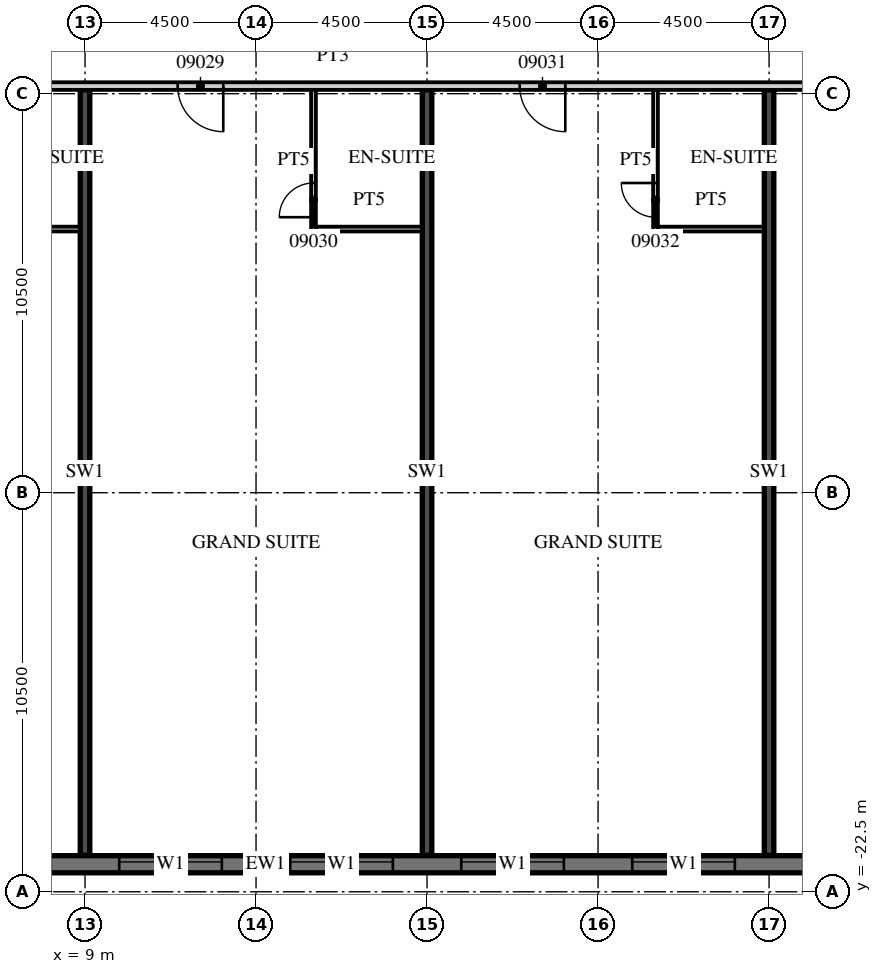
"""IFC4 building model, lengths in metres.
Left out: names, types, materials, properties, quantities, classifications, styles, units other than length and angle.
Written with IfcOpenShell. Run it as: python <this file> out.ifc"""

import sys

from ifc_helpers import new_model, si_unit, direction, frame, frame_2d, origin, place, context, subcontext, project, spatial, rectangle, extrude, element, fill, save


model = new_model("IFC4")
c1 = context("Model", 3, precision=1e-05, world=origin(), true_north=direction((0.0, 1.0)))
c2 = subcontext(c1, "Body", "Model", "MODEL_VIEW")
j1 = project(units=[si_unit("LENGTHUNIT", "METRE"), si_unit("PLANEANGLEUNIT", "RADIAN")], contexts=[c1])
p1 = place(None, origin())
s1 = spatial("IfcSite", under=j1, at=p1, CompositionType="ELEMENT")
p2 = place(p1, origin())
s2 = spatial("IfcBuilding", under=s1, at=p2, CompositionType="ELEMENT")
p3 = place(p2, frame((0.0, 0.0, 60.0)))
s3 = spatial("IfcBuildingStorey", under=s2, at=p3, CompositionType="ELEMENT", Elevation=60.0)
for number, where, z_axis, x_axis in (
    (1, (9.0, -21.54, 0.0), (0.0, 0.0, 1.0), (0.0, 1.0, 0.0)),
    (2, (18.0, -21.54, 0.0), (0.0, 0.0, 1.0), (0.0, 1.0, 0.0)),
    (3, (27.0, -21.54, 0.0), (0.0, 0.0, 1.0), (0.0, 1.0, 0.0)),
):
    element("IfcWall", number, at=place(p3, frame(where, z_axis=z_axis, x_axis=x_axis)), inside=s3, PredefinedType="SHEAR", context=c2, shape_type="SweptSolid", body=[
        extrude(rectangle(XDim=20.14, YDim=0.25, at=frame_2d((10.07, 0.0))), origin(), (0.0, 0.0, 1.0), 3.3),
    ])
p4 = place(p3, frame((-13.5, -21.775, 0.0), z_axis=(0.0, 0.0, 1.0), x_axis=(1.0, 0.0, 0.0)))
e4 = element("IfcWall", 4, at=p4, inside=s3, PredefinedType="SOLIDWALL", context=c2, shape_type="SweptSolid", body=[
    extrude(rectangle(XDim=54.5, YDim=0.45, at=frame_2d((27.25, 0.0))), origin(), (0.0, 0.0, 1.0), 3.02),
])
p5 = place(p4, frame((0.9, 0.0, 0.45)))
e5 = element("IfcOpeningElement", 5, at=p5, cuts=e4, PredefinedType="OPENING", context=c2, shape_type="SweptSolid", body=[
    extrude(rectangle(XDim=2.7, YDim=2.25, at=frame_2d((1.35, 1.125))), frame((0.0, 0.235, 0.0), z_axis=(0.0, -1.0, 0.0), x_axis=(1.0, 0.0, 0.0)), (0.0, 0.0, 1.0), 0.47),
])
p6 = place(p4, frame((5.4, 0.0, 0.45)))
e6 = element("IfcOpeningElement", 6, at=p6, cuts=e4, PredefinedType="OPENING", context=c2, shape_type="SweptSolid", body=[
    extrude(rectangle(XDim=2.7, YDim=2.25, at=frame_2d((1.35, 1.125))), frame((0.0, 0.235, 0.0), z_axis=(0.0, -1.0, 0.0), x_axis=(1.0, 0.0, 0.0)), (0.0, 0.0, 1.0), 0.47),
])
p7 = place(p4, frame((9.9, 0.0, 0.45)))
e7 = element("IfcOpeningElement", 7, at=p7, cuts=e4, PredefinedType="OPENING", context=c2, shape_type="SweptSolid", body=[
    extrude(rectangle(XDim=2.7, YDim=2.25, at=frame_2d((1.35, 1.125))), frame((0.0, 0.235, 0.0), z_axis=(0.0, -1.0, 0.0), x_axis=(1.0, 0.0, 0.0)), (0.0, 0.0, 1.0), 0.47),
])
p8 = place(p4, frame((14.4, 0.0, 0.45)))
e8 = element("IfcOpeningElement", 8, at=p8, cuts=e4, PredefinedType="OPENING", context=c2, shape_type="SweptSolid", body=[
    extrude(rectangle(XDim=2.7, YDim=2.25, at=frame_2d((1.35, 1.125))), frame((0.0, 0.235, 0.0), z_axis=(0.0, -1.0, 0.0), x_axis=(1.0, 0.0, 0.0)), (0.0, 0.0, 1.0), 0.47),
])
p9 = place(p4, frame((18.9, 0.0, 0.45)))
e9 = element("IfcOpeningElement", 9, at=p9, cuts=e4, PredefinedType="OPENING", context=c2, shape_type="SweptSolid", body=[
    extrude(rectangle(XDim=2.7, YDim=2.25, at=frame_2d((1.35, 1.125))), frame((0.0, 0.235, 0.0), z_axis=(0.0, -1.0, 0.0), x_axis=(1.0, 0.0, 0.0)), (0.0, 0.0, 1.0), 0.47),
])
p10 = place(p4, frame((23.4, 0.0, 0.45)))
e10 = element("IfcOpeningElement", 10, at=p10, cuts=e4, PredefinedType="OPENING", context=c2, shape_type="SweptSolid", body=[
    extrude(rectangle(XDim=2.7, YDim=2.25, at=frame_2d((1.35, 1.125))), frame((0.0, 0.235, 0.0), z_axis=(0.0, -1.0, 0.0), x_axis=(1.0, 0.0, 0.0)), (0.0, 0.0, 1.0), 0.47),
])
p11 = place(p4, frame((27.9, 0.0, 0.45)))
e11 = element("IfcOpeningElement", 11, at=p11, cuts=e4, PredefinedType="OPENING", context=c2, shape_type="SweptSolid", body=[
    extrude(rectangle(XDim=2.7, YDim=2.25, at=frame_2d((1.35, 1.125))), frame((0.0, 0.235, 0.0), z_axis=(0.0, -1.0, 0.0), x_axis=(1.0, 0.0, 0.0)), (0.0, 0.0, 1.0), 0.47),
])
p12 = place(p4, frame((32.4, 0.0, 0.45)))
e12 = element("IfcOpeningElement", 12, at=p12, cuts=e4, PredefinedType="OPENING", context=c2, shape_type="SweptSolid", body=[
    extrude(rectangle(XDim=2.7, YDim=2.25, at=frame_2d((1.35, 1.125))), frame((0.0, 0.235, 0.0), z_axis=(0.0, -1.0, 0.0), x_axis=(1.0, 0.0, 0.0)), (0.0, 0.0, 1.0), 0.47),
])
p13 = place(p4, frame((36.9, 0.0, 0.45)))
e13 = element("IfcOpeningElement", 13, at=p13, cuts=e4, PredefinedType="OPENING", context=c2, shape_type="SweptSolid", body=[
    extrude(rectangle(XDim=2.7, YDim=2.25, at=frame_2d((1.35, 1.125))), frame((0.0, 0.235, 0.0), z_axis=(0.0, -1.0, 0.0), x_axis=(1.0, 0.0, 0.0)), (0.0, 0.0, 1.0), 0.47),
])
p14 = place(p4, frame((41.4, 0.0, 0.45)))
e14 = element("IfcOpeningElement", 14, at=p14, cuts=e4, PredefinedType="OPENING", context=c2, shape_type="SweptSolid", body=[
    extrude(rectangle(XDim=2.7, YDim=2.25, at=frame_2d((1.35, 1.125))), frame((0.0, 0.235, 0.0), z_axis=(0.0, -1.0, 0.0), x_axis=(1.0, 0.0, 0.0)), (0.0, 0.0, 1.0), 0.47),
])
p15 = place(p4, frame((45.9, 0.0, 0.45)))
e15 = element("IfcOpeningElement", 15, at=p15, cuts=e4, PredefinedType="OPENING", context=c2, shape_type="SweptSolid", body=[
    extrude(rectangle(XDim=2.7, YDim=2.25, at=frame_2d((1.35, 1.125))), frame((0.0, 0.235, 0.0), z_axis=(0.0, -1.0, 0.0), x_axis=(1.0, 0.0, 0.0)), (0.0, 0.0, 1.0), 0.47),
])
p16 = place(p4, frame((50.4, 0.0, 0.45)))
e16 = element("IfcOpeningElement", 16, at=p16, cuts=e4, PredefinedType="OPENING", context=c2, shape_type="SweptSolid", body=[
    extrude(rectangle(XDim=2.7, YDim=2.25, at=frame_2d((1.35, 1.125))), frame((0.0, 0.235, 0.0), z_axis=(0.0, -1.0, 0.0), x_axis=(1.0, 0.0, 0.0)), (0.0, 0.0, 1.0), 0.47),
])
p17 = place(p3, frame((-13.5, -1.3, 0.0), z_axis=(0.0, 0.0, 1.0), x_axis=(1.0, 0.0, 0.0)))
e17 = element("IfcWall", 17, at=p17, inside=s3, PredefinedType="PARTITIONING", context=c2, shape_type="SweptSolid", body=[
    extrude(rectangle(XDim=58.05, YDim=0.2, at=frame_2d((29.025, 0.0))), origin(), (0.0, 0.0, 1.0), 3.02),
])
p18 = place(p17, frame((2.925, 0.0, 0.0)))
e18 = element("IfcOpeningElement", 18, at=p18, cuts=e17, PredefinedType="OPENING", context=c2, shape_type="SweptSolid", body=[
    extrude(rectangle(XDim=1.0, YDim=2.1, at=frame_2d((0.5, 1.05))), frame((0.0, 0.11, 0.0), z_axis=(0.0, -1.0, 0.0), x_axis=(1.0, 0.0, 0.0)), (0.0, 0.0, 1.0), 0.22),
])
p19 = place(p17, frame((9.863, 0.0, 0.0)))
e19 = element("IfcOpeningElement", 19, at=p19, cuts=e17, PredefinedType="OPENING", context=c2, shape_type="SweptSolid", body=[
    extrude(rectangle(XDim=1.2, YDim=2.1, at=frame_2d((0.6, 1.05))), frame((0.0, 0.11, 0.0), z_axis=(0.0, -1.0, 0.0), x_axis=(1.0, 0.0, 0.0)), (0.0, 0.0, 1.0), 0.22),
])
p20 = place(p17, frame((16.45, 0.0, 0.0)))
e20 = element("IfcOpeningElement", 20, at=p20, cuts=e17, PredefinedType="OPENING", context=c2, shape_type="SweptSolid", body=[
    extrude(rectangle(XDim=1.0, YDim=2.1, at=frame_2d((0.5, 1.05))), frame((0.0, 0.11, 0.0), z_axis=(0.0, -1.0, 0.0), x_axis=(1.0, 0.0, 0.0)), (0.0, 0.0, 1.0), 0.22),
])
p21 = place(p17, frame((18.55, 0.0, 0.0)))
e21 = element("IfcOpeningElement", 21, at=p21, cuts=e17, PredefinedType="OPENING", context=c2, shape_type="SweptSolid", body=[
    extrude(rectangle(XDim=1.0, YDim=2.1, at=frame_2d((0.5, 1.05))), frame((0.0, 0.11, 0.0), z_axis=(0.0, -1.0, 0.0), x_axis=(1.0, 0.0, 0.0)), (0.0, 0.0, 1.0), 0.22),
])
p22 = place(p17, frame((24.938, 0.0, 0.0)))
e22 = element("IfcOpeningElement", 22, at=p22, cuts=e17, PredefinedType="OPENING", context=c2, shape_type="SweptSolid", body=[
    extrude(rectangle(XDim=1.2, YDim=2.1, at=frame_2d((0.6, 1.05))), frame((0.0, 0.11, 0.0), z_axis=(0.0, -1.0, 0.0), x_axis=(1.0, 0.0, 0.0)), (0.0, 0.0, 1.0), 0.22),
])
p23 = place(p17, frame((33.938, 0.0, 0.0)))
e23 = element("IfcOpeningElement", 23, at=p23, cuts=e17, PredefinedType="OPENING", context=c2, shape_type="SweptSolid", body=[
    extrude(rectangle(XDim=1.2, YDim=2.1, at=frame_2d((0.6, 1.05))), frame((0.0, 0.11, 0.0), z_axis=(0.0, -1.0, 0.0), x_axis=(1.0, 0.0, 0.0)), (0.0, 0.0, 1.0), 0.22),
])
p24 = place(p17, frame((42.938, 0.0, 0.0)))
e24 = element("IfcOpeningElement", 24, at=p24, cuts=e17, PredefinedType="OPENING", context=c2, shape_type="SweptSolid", body=[
    extrude(rectangle(XDim=1.2, YDim=2.1, at=frame_2d((0.6, 1.05))), frame((0.0, 0.11, 0.0), z_axis=(0.0, -1.0, 0.0), x_axis=(1.0, 0.0, 0.0)), (0.0, 0.0, 1.0), 0.22),
])
p25 = place(p17, frame((52.425, 0.0, 0.0)))
e25 = element("IfcOpeningElement", 25, at=p25, cuts=e17, PredefinedType="OPENING", context=c2, shape_type="SweptSolid", body=[
    extrude(rectangle(XDim=1.0, YDim=2.1, at=frame_2d((0.5, 1.05))), frame((0.0, 0.11, 0.0), z_axis=(0.0, -1.0, 0.0), x_axis=(1.0, 0.0, 0.0)), (0.0, 0.0, 1.0), 0.22),
])
p26 = place(p17, frame((56.525, 0.0, 0.0)))
e26 = element("IfcOpeningElement", 26, at=p26, cuts=e17, PredefinedType="OPENING", context=c2, shape_type="SweptSolid", body=[
    extrude(rectangle(XDim=1.0, YDim=2.1, at=frame_2d((0.5, 1.05))), frame((0.0, 0.11, 0.0), z_axis=(0.0, -1.0, 0.0), x_axis=(1.0, 0.0, 0.0)), (0.0, 0.0, 1.0), 0.22),
])
p27 = place(p3, frame((6.625, -5.062, 0.0), z_axis=(0.0, 0.0, 1.0), x_axis=(1.0, 0.0, 0.0)))
e27 = element("IfcWall", 27, at=p27, inside=s3, PredefinedType="PARTITIONING", context=c2, shape_type="SweptSolid", body=[
    extrude(rectangle(XDim=2.25, YDim=0.125, at=frame_2d((1.125, 0.0))), origin(), (0.0, 0.0, 1.0), 3.02),
])
p28 = place(p3, frame((15.012, -5.125, 0.0), z_axis=(0.0, 0.0, 1.0), x_axis=(0.0, 1.0, 0.0)))
e28 = element("IfcWall", 28, at=p28, inside=s3, PredefinedType="PARTITIONING", context=c2, shape_type="SweptSolid", body=[
    extrude(rectangle(XDim=3.725, YDim=0.125, at=frame_2d((1.863, 0.0))), origin(), (0.0, 0.0, 1.0), 3.02),
])
p29 = place(p28, frame((0.375, 0.0, 0.0)))
e29 = element("IfcOpeningElement", 29, at=p29, cuts=e28, PredefinedType="OPENING", context=c2, shape_type="SweptSolid", body=[
    extrude(rectangle(XDim=0.9, YDim=2.1, at=frame_2d((0.45, 1.05))), frame((0.0, 0.073, 0.0), z_axis=(0.0, -1.0, 0.0), x_axis=(1.0, 0.0, 0.0)), (0.0, 0.0, 1.0), 0.145),
])
p30 = place(p3, frame((15.075, -5.062, 0.0), z_axis=(0.0, 0.0, 1.0), x_axis=(1.0, 0.0, 0.0)))
e30 = element("IfcWall", 30, at=p30, inside=s3, PredefinedType="PARTITIONING", context=c2, shape_type="SweptSolid", body=[
    extrude(rectangle(XDim=2.8, YDim=0.125, at=frame_2d((1.4, 0.0))), origin(), (0.0, 0.0, 1.0), 3.02),
])
p31 = place(p3, frame((24.012, -5.125, 0.0), z_axis=(0.0, 0.0, 1.0), x_axis=(0.0, 1.0, 0.0)))
e31 = element("IfcWall", 31, at=p31, inside=s3, PredefinedType="PARTITIONING", context=c2, shape_type="SweptSolid", body=[
    extrude(rectangle(XDim=3.725, YDim=0.125, at=frame_2d((1.863, 0.0))), origin(), (0.0, 0.0, 1.0), 3.02),
])
p32 = place(p31, frame((0.375, 0.0, 0.0)))
e32 = element("IfcOpeningElement", 32, at=p32, cuts=e31, PredefinedType="OPENING", context=c2, shape_type="SweptSolid", body=[
    extrude(rectangle(XDim=0.9, YDim=2.1, at=frame_2d((0.45, 1.05))), frame((0.0, 0.073, 0.0), z_axis=(0.0, -1.0, 0.0), x_axis=(1.0, 0.0, 0.0)), (0.0, 0.0, 1.0), 0.145),
])
p33 = place(p3, frame((24.075, -5.062, 0.0), z_axis=(0.0, 0.0, 1.0), x_axis=(1.0, 0.0, 0.0)))
e33 = element("IfcWall", 33, at=p33, inside=s3, PredefinedType="PARTITIONING", context=c2, shape_type="SweptSolid", body=[
    extrude(rectangle(XDim=2.8, YDim=0.125, at=frame_2d((1.4, 0.0))), origin(), (0.0, 0.0, 1.0), 3.02),
])
p34 = place(p10, origin())
e34 = element("IfcWindow", 34, at=p34, inside=s3, PartitioningType="SINGLE_PANEL", PredefinedType="WINDOW", context=c2, shape_type="SweptSolid", body=[
    extrude(rectangle(XDim=2.7, YDim=2.25, at=frame_2d((1.35, 1.125))), frame((0.0, 0.09, 0.0), z_axis=(0.0, -1.0, 0.0), x_axis=(1.0, 0.0, 0.0)), (0.0, 0.0, 1.0), 0.06),
])
fill(e10, e34)
p35 = place(p11, origin())
e35 = element("IfcWindow", 35, at=p35, inside=s3, PartitioningType="SINGLE_PANEL", PredefinedType="WINDOW", context=c2, shape_type="SweptSolid", body=[
    extrude(rectangle(XDim=2.7, YDim=2.25, at=frame_2d((1.35, 1.125))), frame((0.0, 0.09, 0.0), z_axis=(0.0, -1.0, 0.0), x_axis=(1.0, 0.0, 0.0)), (0.0, 0.0, 1.0), 0.06),
])
fill(e11, e35)
p36 = place(p12, origin())
e36 = element("IfcWindow", 36, at=p36, inside=s3, PartitioningType="SINGLE_PANEL", PredefinedType="WINDOW", context=c2, shape_type="SweptSolid", body=[
    extrude(rectangle(XDim=2.7, YDim=2.25, at=frame_2d((1.35, 1.125))), frame((0.0, 0.09, 0.0), z_axis=(0.0, -1.0, 0.0), x_axis=(1.0, 0.0, 0.0)), (0.0, 0.0, 1.0), 0.06),
])
fill(e12, e36)
p37 = place(p13, origin())
e37 = element("IfcWindow", 37, at=p37, inside=s3, PartitioningType="SINGLE_PANEL", PredefinedType="WINDOW", context=c2, shape_type="SweptSolid", body=[
    extrude(rectangle(XDim=2.7, YDim=2.25, at=frame_2d((1.35, 1.125))), frame((0.0, 0.09, 0.0), z_axis=(0.0, -1.0, 0.0), x_axis=(1.0, 0.0, 0.0)), (0.0, 0.0, 1.0), 0.06),
])
fill(e13, e37)
p38 = place(p22, origin())
e38 = element("IfcDoor", 38, at=p38, inside=s3, OperationType="SINGLE_SWING_RIGHT", PredefinedType="DOOR", context=c2, shape_type="SweptSolid", body=[
    extrude(rectangle(XDim=1.2, YDim=2.1, at=frame_2d((0.6, 1.05))), frame((0.0, 0.025, 0.0), z_axis=(0.0, -1.0, 0.0), x_axis=(1.0, 0.0, 0.0)), (0.0, 0.0, 1.0), 0.05),
])
fill(e22, e38)
p39 = place(p29, origin())
e39 = element("IfcDoor", 39, at=p39, inside=s3, OperationType="SINGLE_SWING_LEFT", PredefinedType="DOOR", context=c2, shape_type="SweptSolid", body=[
    extrude(rectangle(XDim=0.9, YDim=2.1, at=frame_2d((0.45, 1.05))), frame((0.0, 0.025, 0.0), z_axis=(0.0, -1.0, 0.0), x_axis=(1.0, 0.0, 0.0)), (0.0, 0.0, 1.0), 0.05),
])
fill(e29, e39)
p40 = place(p23, origin())
e40 = element("IfcDoor", 40, at=p40, inside=s3, OperationType="SINGLE_SWING_RIGHT", PredefinedType="DOOR", context=c2, shape_type="SweptSolid", body=[
    extrude(rectangle(XDim=1.2, YDim=2.1, at=frame_2d((0.6, 1.05))), frame((0.0, 0.025, 0.0), z_axis=(0.0, -1.0, 0.0), x_axis=(1.0, 0.0, 0.0)), (0.0, 0.0, 1.0), 0.05),
])
fill(e23, e40)
p41 = place(p32, origin())
e41 = element("IfcDoor", 41, at=p41, inside=s3, OperationType="SINGLE_SWING_RIGHT", PredefinedType="DOOR", context=c2, shape_type="SweptSolid", body=[
    extrude(rectangle(XDim=0.9, YDim=2.1, at=frame_2d((0.45, 1.05))), frame((0.0, 0.025, 0.0), z_axis=(0.0, -1.0, 0.0), x_axis=(1.0, 0.0, 0.0)), (0.0, 0.0, 1.0), 0.05),
])
fill(e32, e41)
save(model, sys.argv[1])
